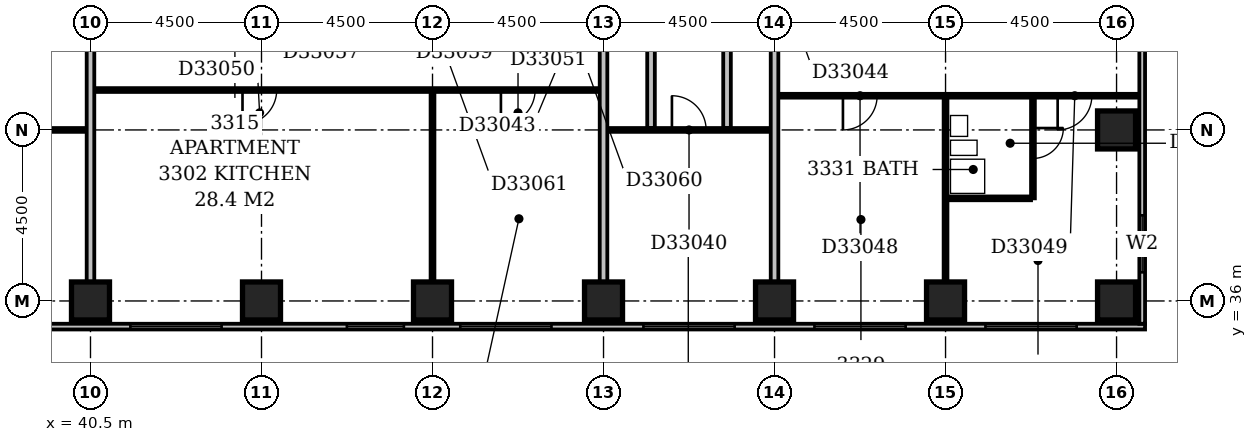
"""IFC4 building model, lengths in metres.
Left out: names, types, materials, properties, quantities, classifications, styles, units other than length and angle.
Written with IfcOpenShell. Run it as: python <this file> out.ifc"""

import sys

from ifc_helpers import new_model, si_unit, direction, frame, frame_2d, origin, origin_2d, place, context, subcontext, project, spatial, rectangle, extrude, element, fill, save


model = new_model("IFC4")
c1 = context("Model", 3, precision=1e-05, world=origin(), true_north=direction((0.0, 1.0)))
c2 = subcontext(c1, "Body", "Model", "MODEL_VIEW")
j1 = project(units=[si_unit("LENGTHUNIT", "METRE"), si_unit("PLANEANGLEUNIT", "RADIAN")], contexts=[c1])
p1 = place(None, origin())
s1 = spatial("IfcSite", under=j1, at=p1, CompositionType="ELEMENT")
p2 = place(p1, origin())
s2 = spatial("IfcBuilding", under=s1, at=p2, CompositionType="ELEMENT")
p3 = place(p2, frame((0.0, 0.0, 134.0)))
s3 = spatial("IfcBuildingStorey", under=s2, at=p3, CompositionType="ELEMENT", Elevation=134.0)
for number, where, z_axis, x_axis in (
    (1, (40.5, 36.0, -0.3), (0.0, 0.0, 1.0), (1.0, 0.0, 0.0)),
    (2, (45.0, 36.0, -0.3), (0.0, 0.0, 1.0), (1.0, 0.0, 0.0)),
    (3, (49.5, 36.0, -0.3), (0.0, 0.0, 1.0), (1.0, 0.0, 0.0)),
    (4, (54.0, 36.0, -0.3), (0.0, 0.0, 1.0), (1.0, 0.0, 0.0)),
    (5, (58.5, 36.0, -0.3), (0.0, 0.0, 1.0), (1.0, 0.0, 0.0)),
    (6, (63.0, 36.0, -0.3), (0.0, 0.0, 1.0), (1.0, 0.0, 0.0)),
    (7, (67.5, 36.0, -0.3), (0.0, 0.0, 1.0), (1.0, 0.0, 0.0)),
    (8, (67.5, 40.5, -0.3), (0.0, 0.0, 1.0), (1.0, 0.0, 0.0)),
):
    element("IfcColumn", number, at=place(p3, frame(where, z_axis=z_axis, x_axis=x_axis)), inside=s3, PredefinedType="COLUMN", context=c2, shape_type="SweptSolid", body=[
        extrude(rectangle(XDim=1.0, YDim=1.0, at=origin_2d()), origin(), (0.0, 0.0, 1.0), 3.6),
    ])
p4 = place(p3, frame((23.1, 35.325, 0.0), z_axis=(0.0, 0.0, 1.0), x_axis=(1.0, 0.0, 0.0)))
e9 = element("IfcWall", 9, at=p4, inside=s3, PredefinedType="STANDARD", context=c2, shape_type="SweptSolid", body=[
    extrude(rectangle(XDim=45.15, YDim=0.15, at=frame_2d((22.575, 0.0))), origin(), (0.0, 0.0, 1.0), 2.7),
])
p5 = place(p4, frame((0.312, 0.0, 0.6)))
e10 = element("IfcOpeningElement", 10, at=p5, cuts=e9, PredefinedType="OPENING", context=c2, shape_type="SweptSolid", body=[
    extrude(rectangle(XDim=2.1, YDim=1.8, at=frame_2d((1.05, 0.9))), frame((0.0, 0.087, 0.0), z_axis=(0.0, -1.0, 0.0), x_axis=(1.0, 0.0, 0.0)), (0.0, 0.0, 1.0), 0.174),
])
p6 = place(p4, frame((4.95, 0.0, 0.6)))
e11 = element("IfcOpeningElement", 11, at=p6, cuts=e9, PredefinedType="OPENING", context=c2, shape_type="SweptSolid", body=[
    extrude(rectangle(XDim=2.4, YDim=1.8, at=frame_2d((1.2, 0.9))), frame((0.0, 0.087, 0.0), z_axis=(0.0, -1.0, 0.0), x_axis=(1.0, 0.0, 0.0)), (0.0, 0.0, 1.0), 0.174),
])
p7 = place(p4, frame((9.45, 0.0, 0.6)))
e12 = element("IfcOpeningElement", 12, at=p7, cuts=e9, PredefinedType="OPENING", context=c2, shape_type="SweptSolid", body=[
    extrude(rectangle(XDim=2.4, YDim=1.8, at=frame_2d((1.2, 0.9))), frame((0.0, 0.087, 0.0), z_axis=(0.0, -1.0, 0.0), x_axis=(1.0, 0.0, 0.0)), (0.0, 0.0, 1.0), 0.174),
])
p8 = place(p4, frame((13.95, 0.0, 0.6)))
e13 = element("IfcOpeningElement", 13, at=p8, cuts=e9, PredefinedType="OPENING", context=c2, shape_type="SweptSolid", body=[
    extrude(rectangle(XDim=2.4, YDim=1.8, at=frame_2d((1.2, 0.9))), frame((0.0, 0.087, 0.0), z_axis=(0.0, -1.0, 0.0), x_axis=(1.0, 0.0, 0.0)), (0.0, 0.0, 1.0), 0.174),
])
p9 = place(p4, frame((18.45, 0.0, 0.6)))
e14 = element("IfcOpeningElement", 14, at=p9, cuts=e9, PredefinedType="OPENING", context=c2, shape_type="SweptSolid", body=[
    extrude(rectangle(XDim=2.4, YDim=1.8, at=frame_2d((1.2, 0.9))), frame((0.0, 0.087, 0.0), z_axis=(0.0, -1.0, 0.0), x_axis=(1.0, 0.0, 0.0)), (0.0, 0.0, 1.0), 0.174),
])
p10 = place(p4, frame((24.146, 0.0, 0.6)))
e15 = element("IfcOpeningElement", 15, at=p10, cuts=e9, PredefinedType="OPENING", context=c2, shape_type="SweptSolid", body=[
    extrude(rectangle(XDim=1.5, YDim=1.8, at=frame_2d((0.75, 0.9))), frame((0.0, 0.087, 0.0), z_axis=(0.0, -1.0, 0.0), x_axis=(1.0, 0.0, 0.0)), (0.0, 0.0, 1.0), 0.174),
])
p11 = place(p4, frame((27.131, 0.0, 0.6)))
e16 = element("IfcOpeningElement", 16, at=p11, cuts=e9, PredefinedType="OPENING", context=c2, shape_type="SweptSolid", body=[
    extrude(rectangle(XDim=2.4, YDim=1.8, at=frame_2d((1.2, 0.9))), frame((0.0, 0.087, 0.0), z_axis=(0.0, -1.0, 0.0), x_axis=(1.0, 0.0, 0.0)), (0.0, 0.0, 1.0), 0.174),
])
p12 = place(p4, frame((31.95, 0.0, 0.6)))
e17 = element("IfcOpeningElement", 17, at=p12, cuts=e9, PredefinedType="OPENING", context=c2, shape_type="SweptSolid", body=[
    extrude(rectangle(XDim=2.4, YDim=1.8, at=frame_2d((1.2, 0.9))), frame((0.0, 0.087, 0.0), z_axis=(0.0, -1.0, 0.0), x_axis=(1.0, 0.0, 0.0)), (0.0, 0.0, 1.0), 0.174),
])
p13 = place(p4, frame((36.45, 0.0, 0.6)))
e18 = element("IfcOpeningElement", 18, at=p13, cuts=e9, PredefinedType="OPENING", context=c2, shape_type="SweptSolid", body=[
    extrude(rectangle(XDim=2.4, YDim=1.8, at=frame_2d((1.2, 0.9))), frame((0.0, 0.087, 0.0), z_axis=(0.0, -1.0, 0.0), x_axis=(1.0, 0.0, 0.0)), (0.0, 0.0, 1.0), 0.174),
])
p14 = place(p4, frame((40.95, 0.0, 0.6)))
e19 = element("IfcOpeningElement", 19, at=p14, cuts=e9, PredefinedType="OPENING", context=c2, shape_type="SweptSolid", body=[
    extrude(rectangle(XDim=2.4, YDim=1.8, at=frame_2d((1.2, 0.9))), frame((0.0, 0.087, 0.0), z_axis=(0.0, -1.0, 0.0), x_axis=(1.0, 0.0, 0.0)), (0.0, 0.0, 1.0), 0.174),
])
p15 = place(p3, frame((68.175, 35.4, 0.0), z_axis=(0.0, 0.0, 1.0), x_axis=(0.0, 1.0, 0.0)))
e20 = element("IfcWall", 20, at=p15, inside=s3, PredefinedType="STANDARD", context=c2, shape_type="SweptSolid", body=[
    extrude(rectangle(XDim=23.85, YDim=0.15, at=frame_2d((11.925, 0.0))), origin(), (0.0, 0.0, 1.0), 2.7),
])
p16 = place(p15, frame((1.354, 0.0, 0.6)))
e21 = element("IfcOpeningElement", 21, at=p16, cuts=e20, PredefinedType="OPENING", context=c2, shape_type="SweptSolid", body=[
    extrude(rectangle(XDim=1.5, YDim=1.8, at=frame_2d((0.75, 0.9))), frame((0.0, 0.087, 0.0), z_axis=(0.0, -1.0, 0.0), x_axis=(1.0, 0.0, 0.0)), (0.0, 0.0, 1.0), 0.174),
])
p17 = place(p15, frame((10.65, 0.0, 0.6)))
e22 = element("IfcOpeningElement", 22, at=p17, cuts=e20, PredefinedType="OPENING", context=c2, shape_type="SweptSolid", body=[
    extrude(rectangle(XDim=2.4, YDim=1.8, at=frame_2d((1.2, 0.9))), frame((0.0, 0.087, 0.0), z_axis=(0.0, -1.0, 0.0), x_axis=(1.0, 0.0, 0.0)), (0.0, 0.0, 1.0), 0.174),
])
p18 = place(p3, frame((40.5, 36.5, 0.0), z_axis=(0.0, 0.0, 1.0), x_axis=(0.0, 1.0, 0.0)))
e23 = element("IfcWall", 23, at=p18, inside=s3, PredefinedType="PARTITIONING", context=c2, shape_type="SweptSolid", body=[
    extrude(rectangle(XDim=12.9, YDim=0.2, at=frame_2d((6.45, 0.0))), origin(), (0.0, 0.0, 1.0), 3.3),
])
p19 = place(p3, frame((49.5, 36.5, 0.0), z_axis=(0.0, 0.0, 1.0), x_axis=(0.0, 1.0, 0.0)))
e24 = element("IfcWall", 24, at=p19, inside=s3, PredefinedType="PARTITIONING", context=c2, shape_type="SweptSolid", body=[
    extrude(rectangle(XDim=5.0, YDim=0.1, at=frame_2d((2.5, 0.0))), origin(), (0.0, 0.0, 1.0), 3.3),
])
p20 = place(p3, frame((54.0, 36.5, 0.0), z_axis=(0.0, 0.0, 1.0), x_axis=(0.0, 1.0, 0.0)))
e25 = element("IfcWall", 25, at=p20, inside=s3, PredefinedType="PARTITIONING", context=c2, shape_type="SweptSolid", body=[
    extrude(rectangle(XDim=12.9, YDim=0.2, at=frame_2d((6.45, 0.0))), origin(), (0.0, 0.0, 1.0), 2.6),
])
p21 = place(p3, frame((58.5, 36.5, 0.0), z_axis=(0.0, 0.0, 1.0), x_axis=(0.0, 1.0, 0.0)))
e26 = element("IfcWall", 26, at=p21, inside=s3, PredefinedType="PARTITIONING", context=c2, shape_type="SweptSolid", body=[
    extrude(rectangle(XDim=12.9, YDim=0.2, at=frame_2d((6.45, 0.0))), origin(), (0.0, 0.0, 1.0), 3.3),
])
p22 = place(p3, frame((63.0, 36.5, 0.0), z_axis=(0.0, 0.0, 1.0), x_axis=(0.0, 1.0, 0.0)))
e27 = element("IfcWall", 27, at=p22, inside=s3, PredefinedType="PARTITIONING", context=c2, shape_type="SweptSolid", body=[
    extrude(rectangle(XDim=4.85, YDim=0.1, at=frame_2d((2.425, 0.0))), origin(), (0.0, 0.0, 1.0), 2.4),
])
p23 = place(p3, frame((63.05, 38.7, 0.0), z_axis=(0.0, 0.0, 1.0), x_axis=(1.0, 0.0, 0.0)))
e28 = element("IfcWall", 28, at=p23, inside=s3, PredefinedType="PLUMBINGWALL", context=c2, shape_type="SweptSolid", body=[
    extrude(rectangle(XDim=2.2, YDim=0.1, at=frame_2d((1.1, 0.0))), origin(), (0.0, 0.0, 1.0), 3.3),
])
p24 = place(p3, frame((65.3, 38.7, 0.0), z_axis=(0.0, 0.0, 1.0), x_axis=(0.0, 1.0, 0.0)))
e29 = element("IfcWall", 29, at=p24, inside=s3, PredefinedType="PLUMBINGWALL", context=c2, shape_type="SweptSolid", body=[
    extrude(rectangle(XDim=2.65, YDim=0.1, at=frame_2d((1.325, 0.0))), origin(), (0.0, 0.0, 1.0), 3.3),
])
p25 = place(p24, frame((1.05, 0.0, 0.0)))
e30 = element("IfcOpeningElement", 30, at=p25, cuts=e29, PredefinedType="OPENING", context=c2, shape_type="SweptSolid", body=[
    extrude(rectangle(XDim=0.8, YDim=2.1, at=frame_2d((0.4, 1.05))), frame((0.0, 0.062, 0.0), z_axis=(0.0, -1.0, 0.0), x_axis=(1.0, 0.0, 0.0)), (0.0, 0.0, 1.0), 0.124),
])
p26 = place(p3, frame((36.1, 40.5, 0.0), z_axis=(0.0, 0.0, 1.0), x_axis=(1.0, 0.0, 0.0)))
e31 = element("IfcWall", 31, at=p26, inside=s3, PredefinedType="PARTITIONING", context=c2, shape_type="SweptSolid", body=[
    extrude(rectangle(XDim=4.3, YDim=0.1, at=frame_2d((2.15, 0.0))), origin(), (0.0, 0.0, 1.0), 3.3),
])
p27 = place(p26, frame((1.7, 0.0, 0.0)))
e32 = element("IfcOpeningElement", 32, at=p27, cuts=e31, PredefinedType="OPENING", context=c2, shape_type="SweptSolid", body=[
    extrude(rectangle(XDim=0.9, YDim=2.1, at=frame_2d((0.45, 1.05))), frame((0.0, 0.062, 0.0), z_axis=(0.0, -1.0, 0.0), x_axis=(1.0, 0.0, 0.0)), (0.0, 0.0, 1.0), 0.124),
])
p28 = place(p3, frame((54.1, 40.5, 0.0), z_axis=(0.0, 0.0, 1.0), x_axis=(1.0, 0.0, 0.0)))
e33 = element("IfcWall", 33, at=p28, inside=s3, PredefinedType="PARTITIONING", context=c2, shape_type="SweptSolid", body=[
    extrude(rectangle(XDim=4.3, YDim=0.1, at=frame_2d((2.15, 0.0))), origin(), (0.0, 0.0, 1.0), 3.3),
])
p29 = place(p28, frame((1.7, 0.0, 0.0)))
e34 = element("IfcOpeningElement", 34, at=p29, cuts=e33, PredefinedType="OPENING", context=c2, shape_type="SweptSolid", body=[
    extrude(rectangle(XDim=0.9, YDim=2.1, at=frame_2d((0.45, 1.05))), frame((0.0, 0.062, 0.0), z_axis=(0.0, -1.0, 0.0), x_axis=(1.0, 0.0, 0.0)), (0.0, 0.0, 1.0), 0.124),
])
p30 = place(p3, frame((55.25, 40.55, 0.0), z_axis=(0.0, 0.0, 1.0), x_axis=(0.0, 1.0, 0.0)))
e35 = element("IfcWall", 35, at=p30, inside=s3, PredefinedType="PARTITIONING", context=c2, shape_type="SweptSolid", body=[
    extrude(rectangle(XDim=8.95, YDim=0.2, at=frame_2d((4.475, 0.0))), origin(), (0.0, 0.0, 1.0), 3.3),
])
p31 = place(p30, frame((5.55, 0.0, 0.0)))
e36 = element("IfcOpeningElement", 36, at=p31, cuts=e35, PredefinedType="OPENING", context=c2, shape_type="SweptSolid", body=[
    extrude(rectangle(XDim=0.8, YDim=2.1, at=frame_2d((0.4, 1.05))), frame((0.0, 0.112, 0.0), z_axis=(0.0, -1.0, 0.0), x_axis=(1.0, 0.0, 0.0)), (0.0, 0.0, 1.0), 0.224),
])
p32 = place(p3, frame((57.25, 40.55, 0.0), z_axis=(0.0, 0.0, 1.0), x_axis=(0.0, 1.0, 0.0)))
e37 = element("IfcWall", 37, at=p32, inside=s3, PredefinedType="PARTITIONING", context=c2, shape_type="SweptSolid", body=[
    extrude(rectangle(XDim=8.95, YDim=0.2, at=frame_2d((4.475, 0.0))), origin(), (0.0, 0.0, 1.0), 3.3),
])
p33 = place(p32, frame((5.55, 0.0, 0.0)))
e38 = element("IfcOpeningElement", 38, at=p33, cuts=e37, PredefinedType="OPENING", context=c2, shape_type="SweptSolid", body=[
    extrude(rectangle(XDim=0.8, YDim=2.1, at=frame_2d((0.4, 1.05))), frame((0.0, 0.112, 0.0), z_axis=(0.0, -1.0, 0.0), x_axis=(1.0, 0.0, 0.0)), (0.0, 0.0, 1.0), 0.224),
])
p34 = place(p3, frame((58.6, 41.4, 0.0), z_axis=(0.0, 0.0, 1.0), x_axis=(1.0, 0.0, 0.0)))
e39 = element("IfcWall", 39, at=p34, inside=s3, PredefinedType="PARTITIONING", context=c2, shape_type="SweptSolid", body=[
    extrude(rectangle(XDim=9.5, YDim=0.1, at=frame_2d((4.75, 0.0))), origin(), (0.0, 0.0, 1.0), 3.3),
])
p35 = place(p34, frame((1.7, 0.0, 0.0)))
e40 = element("IfcOpeningElement", 40, at=p35, cuts=e39, PredefinedType="OPENING", context=c2, shape_type="SweptSolid", body=[
    extrude(rectangle(XDim=0.9, YDim=2.1, at=frame_2d((0.45, 1.05))), frame((0.0, 0.062, 0.0), z_axis=(0.0, -1.0, 0.0), x_axis=(1.0, 0.0, 0.0)), (0.0, 0.0, 1.0), 0.124),
])
p36 = place(p34, frame((7.35, 0.0, 0.0)))
e41 = element("IfcOpeningElement", 41, at=p36, cuts=e39, PredefinedType="OPENING", context=c2, shape_type="SweptSolid", body=[
    extrude(rectangle(XDim=0.9, YDim=2.1, at=frame_2d((0.45, 1.05))), frame((0.0, 0.062, 0.0), z_axis=(0.0, -1.0, 0.0), x_axis=(1.0, 0.0, 0.0)), (0.0, 0.0, 1.0), 0.124),
])
p37 = place(p3, frame((40.6, 41.55, 0.0), z_axis=(0.0, 0.0, 1.0), x_axis=(1.0, 0.0, 0.0)))
e42 = element("IfcWall", 42, at=p37, inside=s3, PredefinedType="PARTITIONING", context=c2, shape_type="SweptSolid", body=[
    extrude(rectangle(XDim=13.3, YDim=0.1, at=frame_2d((6.65, 0.0))), origin(), (0.0, 0.0, 1.0), 3.3),
])
p38 = place(p37, frame((3.9, 0.0, 0.0)))
e43 = element("IfcOpeningElement", 43, at=p38, cuts=e42, PredefinedType="OPENING", context=c2, shape_type="SweptSolid", body=[
    extrude(rectangle(XDim=0.9, YDim=2.1, at=frame_2d((0.45, 1.05))), frame((0.0, 0.062, 0.0), z_axis=(0.0, -1.0, 0.0), x_axis=(1.0, 0.0, 0.0)), (0.0, 0.0, 1.0), 0.124),
])
p39 = place(p37, frame((10.7, 0.0, 0.0)))
e44 = element("IfcOpeningElement", 44, at=p39, cuts=e42, PredefinedType="OPENING", context=c2, shape_type="SweptSolid", body=[
    extrude(rectangle(XDim=0.9, YDim=2.1, at=frame_2d((0.45, 1.05))), frame((0.0, 0.062, 0.0), z_axis=(0.0, -1.0, 0.0), x_axis=(1.0, 0.0, 0.0)), (0.0, 0.0, 1.0), 0.124),
])
p40 = place(p9, origin())
e45 = element("IfcWindow", 45, at=p40, inside=s3, PartitioningType="SINGLE_PANEL", PredefinedType="WINDOW", context=c2, shape_type="SweptSolid", body=[
    extrude(rectangle(XDim=2.4, YDim=1.8, at=frame_2d((1.2, 0.9))), frame((0.0, 0.03, 0.0), z_axis=(0.0, -1.0, 0.0), x_axis=(1.0, 0.0, 0.0)), (0.0, 0.0, 1.0), 0.06),
])
fill(e14, e45)
p41 = place(p10, origin())
e46 = element("IfcWindow", 46, at=p41, inside=s3, PartitioningType="SINGLE_PANEL", PredefinedType="WINDOW", context=c2, shape_type="SweptSolid", body=[
    extrude(rectangle(XDim=1.5, YDim=1.8, at=frame_2d((0.75, 0.9))), frame((0.0, 0.03, 0.0), z_axis=(0.0, -1.0, 0.0), x_axis=(1.0, 0.0, 0.0)), (0.0, 0.0, 1.0), 0.06),
])
fill(e15, e46)
p42 = place(p11, origin())
e47 = element("IfcWindow", 47, at=p42, inside=s3, PartitioningType="SINGLE_PANEL", PredefinedType="WINDOW", context=c2, shape_type="SweptSolid", body=[
    extrude(rectangle(XDim=2.4, YDim=1.8, at=frame_2d((1.2, 0.9))), frame((0.0, 0.03, 0.0), z_axis=(0.0, -1.0, 0.0), x_axis=(1.0, 0.0, 0.0)), (0.0, 0.0, 1.0), 0.06),
])
fill(e16, e47)
p43 = place(p12, origin())
e48 = element("IfcWindow", 48, at=p43, inside=s3, PartitioningType="SINGLE_PANEL", PredefinedType="WINDOW", context=c2, shape_type="SweptSolid", body=[
    extrude(rectangle(XDim=2.4, YDim=1.8, at=frame_2d((1.2, 0.9))), frame((0.0, 0.03, 0.0), z_axis=(0.0, -1.0, 0.0), x_axis=(1.0, 0.0, 0.0)), (0.0, 0.0, 1.0), 0.06),
])
fill(e17, e48)
p44 = place(p13, origin())
e49 = element("IfcWindow", 49, at=p44, inside=s3, PartitioningType="SINGLE_PANEL", PredefinedType="WINDOW", context=c2, shape_type="SweptSolid", body=[
    extrude(rectangle(XDim=2.4, YDim=1.8, at=frame_2d((1.2, 0.9))), frame((0.0, 0.03, 0.0), z_axis=(0.0, -1.0, 0.0), x_axis=(1.0, 0.0, 0.0)), (0.0, 0.0, 1.0), 0.06),
])
fill(e18, e49)
p45 = place(p14, origin())
e50 = element("IfcWindow", 50, at=p45, inside=s3, PartitioningType="SINGLE_PANEL", PredefinedType="WINDOW", context=c2, shape_type="SweptSolid", body=[
    extrude(rectangle(XDim=2.4, YDim=1.8, at=frame_2d((1.2, 0.9))), frame((0.0, 0.03, 0.0), z_axis=(0.0, -1.0, 0.0), x_axis=(1.0, 0.0, 0.0)), (0.0, 0.0, 1.0), 0.06),
])
fill(e19, e50)
p46 = place(p16, origin())
e51 = element("IfcWindow", 51, at=p46, inside=s3, PartitioningType="SINGLE_PANEL", PredefinedType="WINDOW", context=c2, shape_type="SweptSolid", body=[
    extrude(rectangle(XDim=1.5, YDim=1.8, at=frame_2d((0.75, 0.9))), frame((0.0, 0.03, 0.0), z_axis=(0.0, -1.0, 0.0), x_axis=(1.0, 0.0, 0.0)), (0.0, 0.0, 1.0), 0.06),
])
fill(e21, e51)
p47 = place(p25, origin())
e52 = element("IfcDoor", 52, at=p47, inside=s3, OperationType="SINGLE_SWING_RIGHT", PredefinedType="DOOR", context=c2, shape_type="SweptSolid", body=[
    extrude(rectangle(XDim=0.8, YDim=2.1, at=frame_2d((0.4, 1.05))), frame((0.0, 0.025, 0.0), z_axis=(0.0, -1.0, 0.0), x_axis=(1.0, 0.0, 0.0)), (0.0, 0.0, 1.0), 0.05),
])
fill(e30, e52)
p48 = place(p29, origin())
e53 = element("IfcDoor", 53, at=p48, inside=s3, OperationType="SINGLE_SWING_LEFT", PredefinedType="DOOR", context=c2, shape_type="SweptSolid", body=[
    extrude(rectangle(XDim=0.9, YDim=2.1, at=frame_2d((0.45, 1.05))), frame((0.0, 0.025, 0.0), z_axis=(0.0, -1.0, 0.0), x_axis=(1.0, 0.0, 0.0)), (0.0, 0.0, 1.0), 0.05),
])
fill(e34, e53)
p49 = place(p35, frame((0.9, 0.0, 0.0), z_axis=(0.0, 0.0, 1.0), x_axis=(-1.0, 0.0, 0.0)))
e54 = element("IfcDoor", 54, at=p49, inside=s3, OperationType="SINGLE_SWING_RIGHT", PredefinedType="DOOR", context=c2, shape_type="SweptSolid", body=[
    extrude(rectangle(XDim=0.9, YDim=2.1, at=frame_2d((0.45, 1.05))), frame((0.0, 0.025, 0.0), z_axis=(0.0, -1.0, 0.0), x_axis=(1.0, 0.0, 0.0)), (0.0, 0.0, 1.0), 0.05),
])
fill(e40, e54)
p50 = place(p36, frame((0.9, 0.0, 0.0), z_axis=(0.0, 0.0, 1.0), x_axis=(-1.0, 0.0, 0.0)))
e55 = element("IfcDoor", 55, at=p50, inside=s3, OperationType="SINGLE_SWING_RIGHT", PredefinedType="DOOR", context=c2, shape_type="SweptSolid", body=[
    extrude(rectangle(XDim=0.9, YDim=2.1, at=frame_2d((0.45, 1.05))), frame((0.0, 0.025, 0.0), z_axis=(0.0, -1.0, 0.0), x_axis=(1.0, 0.0, 0.0)), (0.0, 0.0, 1.0), 0.05),
])
fill(e41, e55)
p51 = place(p38, frame((0.9, 0.0, 0.0), z_axis=(0.0, 0.0, 1.0), x_axis=(-1.0, 0.0, 0.0)))
e56 = element("IfcDoor", 56, at=p51, inside=s3, OperationType="SINGLE_SWING_RIGHT", PredefinedType="DOOR", context=c2, shape_type="SweptSolid", body=[
    extrude(rectangle(XDim=0.9, YDim=2.1, at=frame_2d((0.45, 1.05))), frame((0.0, 0.025, 0.0), z_axis=(0.0, -1.0, 0.0), x_axis=(1.0, 0.0, 0.0)), (0.0, 0.0, 1.0), 0.05),
])
fill(e43, e56)
p52 = place(p39, frame((0.9, 0.0, 0.0), z_axis=(0.0, 0.0, 1.0), x_axis=(-1.0, 0.0, 0.0)))
e57 = element("IfcDoor", 57, at=p52, inside=s3, OperationType="SINGLE_SWING_RIGHT", PredefinedType="DOOR", context=c2, shape_type="SweptSolid", body=[
    extrude(rectangle(XDim=0.9, YDim=2.1, at=frame_2d((0.45, 1.05))), frame((0.0, 0.025, 0.0), z_axis=(0.0, -1.0, 0.0), x_axis=(1.0, 0.0, 0.0)), (0.0, 0.0, 1.0), 0.05),
])
fill(e44, e57)
save(model, sys.argv[1])
